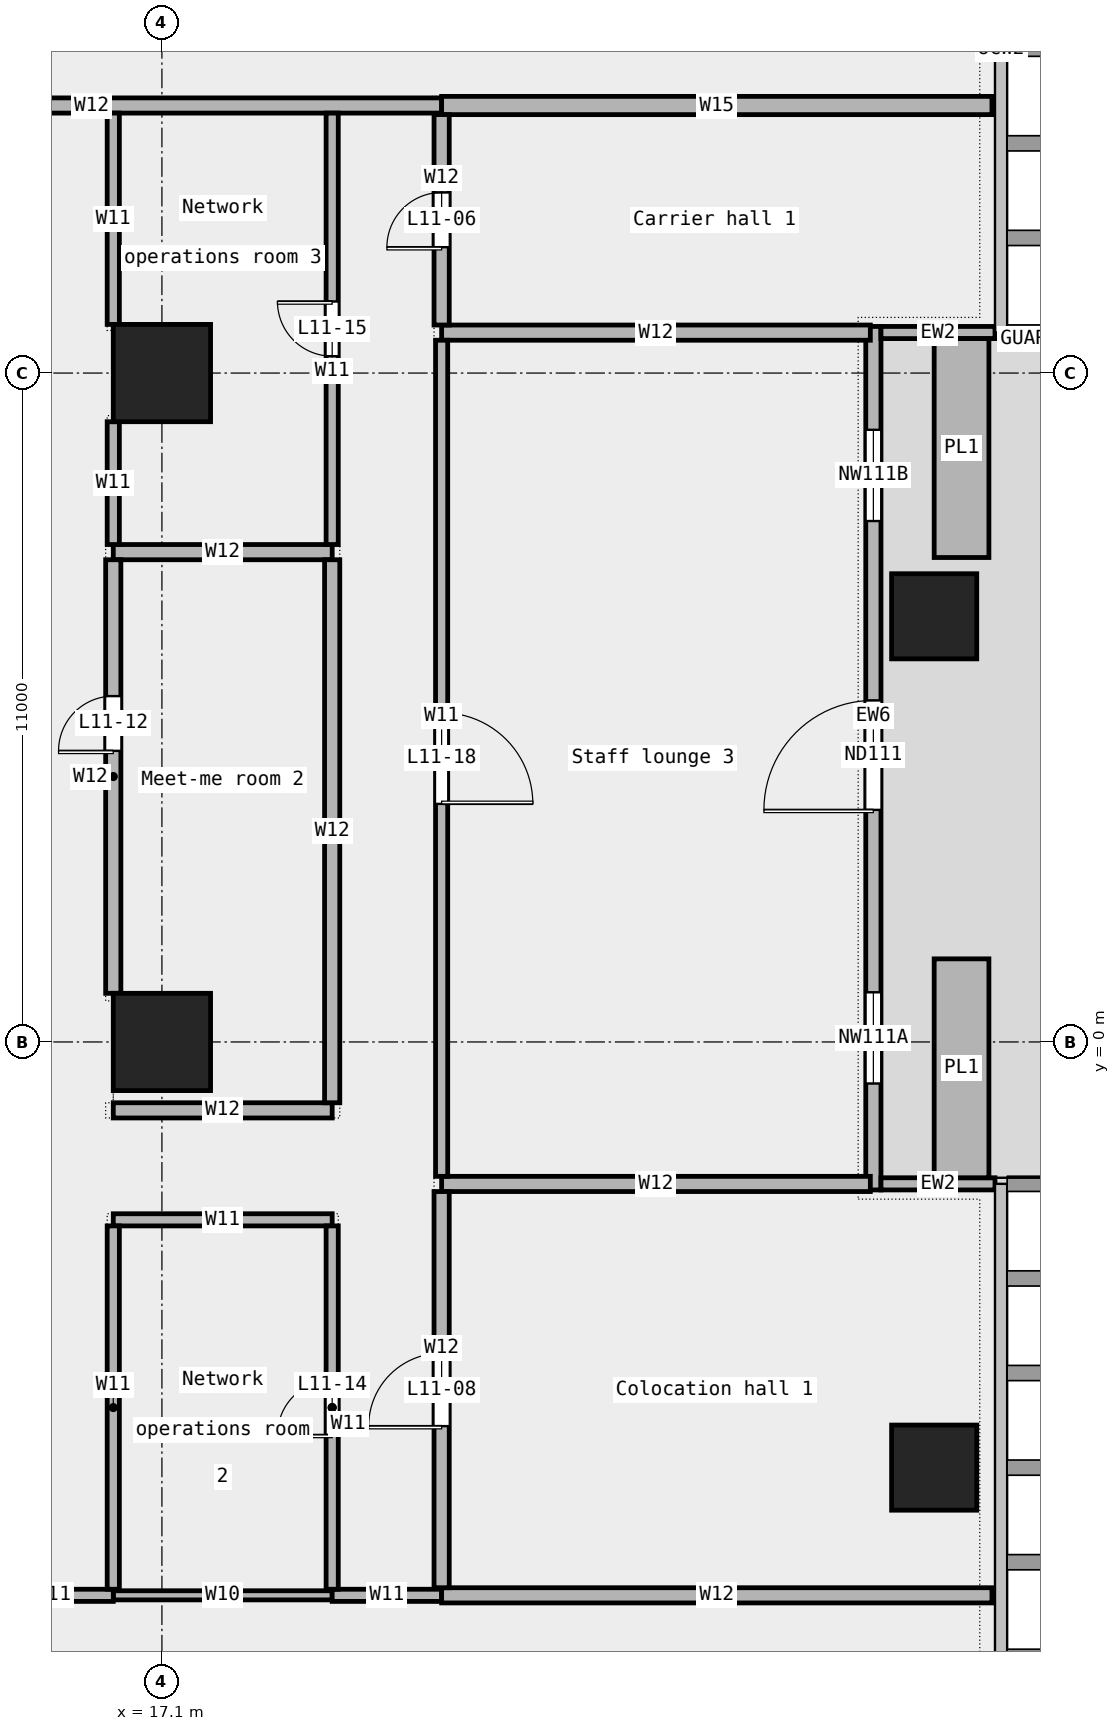
"""IFC4 building model, lengths in metres.
Left out: names, types, materials, properties, quantities, classifications, styles, units other than length and angle.
Written with IfcOpenShell. Run it as: python <this file> out.ifc"""

import sys

from ifc_helpers import new_model, si_unit, direction, frame, frame_2d, origin, origin_2d, place, context, subcontext, project, spatial, rectangle, extrude, element, fill, save


model = new_model("IFC4")
c1 = context("Model", 3, precision=1e-05, world=origin(), true_north=direction((0.0, 1.0)))
c2 = subcontext(c1, "Body", "Model", "MODEL_VIEW")
j1 = project(units=[si_unit("LENGTHUNIT", "METRE"), si_unit("PLANEANGLEUNIT", "RADIAN")], contexts=[c1])
p1 = place(None, origin())
s1 = spatial("IfcSite", under=j1, at=p1, CompositionType="ELEMENT")
p2 = place(p1, origin())
s2 = spatial("IfcBuilding", under=s1, at=p2, CompositionType="ELEMENT")
p3 = place(p2, frame((0.0, 0.0, 59.8)))
s3 = spatial("IfcBuildingStorey", under=s2, at=p3, CompositionType="ELEMENT", Elevation=59.8)
for number, where, z_axis, x_axis in (
    (1, (29.8, -7.0, 0.0), (0.0, 0.0, 1.0), (1.0, 0.0, 0.0)),
    (2, (29.8, 7.0, 0.0), (0.0, 0.0, 1.0), (1.0, 0.0, 0.0)),
):
    element("IfcColumn", number, at=place(p3, frame(where, z_axis=z_axis, x_axis=x_axis)), inside=s3, PredefinedType="COLUMN", context=c2, shape_type="SweptSolid", body=[
        extrude(rectangle(XDim=1.4, YDim=1.4, at=origin_2d()), origin(), (0.0, 0.0, 1.0), 4.35),
    ])
for number, where, z_axis, x_axis in (
    (3, (17.1, 0.0, 0.0), (0.0, 0.0, 1.0), (1.0, 0.0, 0.0)),
    (4, (17.1, 11.0, 0.0), (0.0, 0.0, 1.0), (1.0, 0.0, 0.0)),
):
    element("IfcColumn", number, at=place(p3, frame(where, z_axis=z_axis, x_axis=x_axis)), inside=s3, PredefinedType="COLUMN", context=c2, shape_type="SweptSolid", body=[
        extrude(rectangle(XDim=1.6, YDim=1.6, at=origin_2d()), origin(), (0.0, 0.0, 1.0), 4.35),
    ])
p4 = place(p3, frame((28.8, -2.433, 0.0), z_axis=(0.0, 0.0, 1.0), x_axis=(0.0, 1.0, 0.0)))
e5 = element("IfcWall", 5, at=p4, inside=s3, PredefinedType="STANDARD", context=c2, shape_type="SweptSolid", body=[
    extrude(rectangle(XDim=14.2, YDim=0.25, at=frame_2d((7.1, 0.0))), origin(), (0.0, 0.0, 1.0), 4.35),
])
p5 = place(p4, frame((1.75, 0.0, 0.45)))
e6 = element("IfcOpeningElement", 6, at=p5, cuts=e5, PredefinedType="OPENING", context=c2, shape_type="SweptSolid", body=[
    extrude(rectangle(XDim=1.5, YDim=3.0, at=frame_2d((0.75, 1.5))), frame((0.0, 0.137, 0.0), z_axis=(0.0, -1.0, 0.0), x_axis=(1.0, 0.0, 0.0)), (0.0, 0.0, 1.0), 0.274),
])
p6 = place(p4, frame((6.25, 0.0, 0.0)))
e7 = element("IfcOpeningElement", 7, at=p6, cuts=e5, PredefinedType="OPENING", context=c2, shape_type="SweptSolid", body=[
    extrude(rectangle(XDim=1.8, YDim=2.4, at=frame_2d((0.9, 1.2))), frame((0.0, 0.137, 0.0), z_axis=(0.0, -1.0, 0.0), x_axis=(1.0, 0.0, 0.0)), (0.0, 0.0, 1.0), 0.274),
])
p7 = place(p4, frame((11.0, 0.0, 0.45)))
e8 = element("IfcOpeningElement", 8, at=p7, cuts=e5, PredefinedType="OPENING", context=c2, shape_type="SweptSolid", body=[
    extrude(rectangle(XDim=1.5, YDim=3.0, at=frame_2d((0.75, 1.5))), frame((0.0, 0.137, 0.0), z_axis=(0.0, -1.0, 0.0), x_axis=(1.0, 0.0, 0.0)), (0.0, 0.0, 1.0), 0.274),
])
for number, where, z_axis, x_axis in (
    (9, (30.8, -2.333, 0.0), (0.0, 0.0, 1.0), (-1.0, 0.0, 0.0)),
    (10, (30.8, 11.667, 0.0), (0.0, 0.0, 1.0), (-1.0, 0.0, 0.0)),
):
    element("IfcWall", number, at=place(p3, frame(where, z_axis=z_axis, x_axis=x_axis)), inside=s3, PredefinedType="STANDARD", context=c2, shape_type="SweptSolid", body=[
        extrude(rectangle(XDim=1.875, YDim=0.2, at=frame_2d((0.938, 0.0))), origin(), (0.0, 0.0, 1.0), 4.35),
    ])
for number, where, z_axis, x_axis in (
    (11, (30.25, -2.233, 0.0), (0.0, 0.0, 1.0), (0.0, 1.0, 0.0)),
    (12, (30.25, 7.967, 0.0), (0.0, 0.0, 1.0), (0.0, 1.0, 0.0)),
):
    element("IfcWall", number, at=place(p3, frame(where, z_axis=z_axis, x_axis=x_axis)), inside=s3, PredefinedType="STANDARD", context=c2, shape_type="SweptSolid", body=[
        extrude(rectangle(XDim=3.6, YDim=0.9, at=frame_2d((1.8, 0.0))), origin(), (0.0, 0.0, 1.0), 0.7),
    ])
p8 = place(p3, frame((16.3, -9.1, 0.0), z_axis=(0.0, 0.0, 1.0), x_axis=(1.0, 0.0, 0.0)))
e13 = element("IfcWall", 13, at=p8, inside=s3, PredefinedType="PARTITIONING", context=c2, shape_type="SweptSolid", body=[
    extrude(rectangle(XDim=3.6, YDim=0.15, at=frame_2d((1.8, 0.0))), origin(), (0.0, 0.0, 1.0), 4.35),
])
p9 = place(p3, frame((14.34, -9.1, 0.0), z_axis=(0.0, 0.0, 1.0), x_axis=(1.0, 0.0, 0.0)))
e14 = element("IfcWall", 14, at=p9, inside=s3, PredefinedType="PARTITIONING", context=c2, shape_type="SweptSolid", body=[
    extrude(rectangle(XDim=1.96, YDim=0.2, at=frame_2d((0.98, 0.0))), origin(), (0.0, 0.0, 1.0), 4.35),
])
p10 = place(p3, frame((19.9, -9.1, 0.0), z_axis=(0.0, 0.0, 1.0), x_axis=(1.0, 0.0, 0.0)))
e15 = element("IfcWall", 15, at=p10, inside=s3, PredefinedType="PARTITIONING", context=c2, shape_type="SweptSolid", body=[
    extrude(rectangle(XDim=1.8, YDim=0.2, at=frame_2d((0.9, 0.0))), origin(), (0.0, 0.0, 1.0), 4.35),
])
p11 = place(p3, frame((21.7, -9.1, 0.0), z_axis=(0.0, 0.0, 1.0), x_axis=(1.0, 0.0, 0.0)))
e16 = element("IfcWall", 16, at=p11, inside=s3, PredefinedType="PARTITIONING", context=c2, shape_type="SweptSolid", body=[
    extrude(rectangle(XDim=9.05, YDim=0.25, at=frame_2d((4.525, 0.0))), origin(), (0.0, 0.0, 1.0), 4.35),
])
p12 = place(p3, frame((16.3, -2.925, 0.0), z_axis=(0.0, 0.0, 1.0), x_axis=(1.0, 0.0, 0.0)))
e17 = element("IfcWall", 17, at=p12, inside=s3, PredefinedType="PARTITIONING", context=c2, shape_type="SweptSolid", body=[
    extrude(rectangle(XDim=3.6, YDim=0.2, at=frame_2d((1.8, 0.0))), origin(), (0.0, 0.0, 1.0), 4.35),
])
p13 = place(p3, frame((21.7, -2.335, 0.0), z_axis=(0.0, 0.0, 1.0), x_axis=(1.0, 0.0, 0.0)))
e18 = element("IfcWall", 18, at=p13, inside=s3, PredefinedType="PARTITIONING", context=c2, shape_type="SweptSolid", body=[
    extrude(rectangle(XDim=7.05, YDim=0.25, at=frame_2d((3.525, 0.0))), origin(), (0.0, 0.0, 1.0), 4.35),
])
for number, where, z_axis, x_axis in (
    (19, (16.3, -1.125, 0.0), (0.0, 0.0, 1.0), (1.0, 0.0, 0.0)),
    (20, (16.3, 8.055, 0.0), (0.0, 0.0, 1.0), (1.0, 0.0, 0.0)),
):
    element("IfcWall", number, at=place(p3, frame(where, z_axis=z_axis, x_axis=x_axis)), inside=s3, PredefinedType="PARTITIONING", context=c2, shape_type="SweptSolid", body=[
        extrude(rectangle(XDim=3.6, YDim=0.25, at=frame_2d((1.8, 0.0))), origin(), (0.0, 0.0, 1.0), 4.35),
    ])
p14 = place(p3, frame((21.7, 11.665, 0.0), z_axis=(0.0, 0.0, 1.0), x_axis=(1.0, 0.0, 0.0)))
e21 = element("IfcWall", 21, at=p14, inside=s3, PredefinedType="PARTITIONING", context=c2, shape_type="SweptSolid", body=[
    extrude(rectangle(XDim=7.05, YDim=0.25, at=frame_2d((3.525, 0.0))), origin(), (0.0, 0.0, 1.0), 4.35),
])
p15 = place(p3, frame((10.185, 15.4, 0.0), z_axis=(0.0, 0.0, 1.0), x_axis=(1.0, 0.0, 0.0)))
e22 = element("IfcWall", 22, at=p15, inside=s3, PredefinedType="PARTITIONING", context=c2, shape_type="SweptSolid", body=[
    extrude(rectangle(XDim=11.515, YDim=0.25, at=frame_2d((5.757, 0.0))), origin(), (0.0, 0.0, 1.0), 4.35),
])
p16 = place(p15, frame((2.157, 0.0, 0.0)))
e23 = element("IfcOpeningElement", 23, at=p16, cuts=e22, PredefinedType="OPENING", context=c2, shape_type="SweptSolid", body=[
    extrude(rectangle(XDim=1.8, YDim=2.1, at=frame_2d((0.9, 1.05))), frame((0.0, 0.137, 0.0), z_axis=(0.0, -1.0, 0.0), x_axis=(1.0, 0.0, 0.0)), (0.0, 0.0, 1.0), 0.274),
])
p17 = place(p3, frame((21.7, 15.4, 0.0), z_axis=(0.0, 0.0, 1.0), x_axis=(1.0, 0.0, 0.0)))
e24 = element("IfcWall", 24, at=p17, inside=s3, PredefinedType="PARTITIONING", context=c2, shape_type="SweptSolid", body=[
    extrude(rectangle(XDim=9.05, YDim=0.3, at=frame_2d((4.525, 0.0))), origin(), (0.0, 0.0, 1.0), 4.35),
])
p18 = place(p3, frame((16.3, -9.0, 0.0), z_axis=(0.0, 0.0, 1.0), x_axis=(0.0, 1.0, 0.0)))
e25 = element("IfcWall", 25, at=p18, inside=s3, PredefinedType="PARTITIONING", context=c2, shape_type="SweptSolid", body=[
    extrude(rectangle(XDim=5.975, YDim=0.2, at=frame_2d((2.988, 0.0))), origin(), (0.0, 0.0, 1.0), 4.35),
])
p19 = place(p3, frame((16.3, 8.18, 0.0), z_axis=(0.0, 0.0, 1.0), x_axis=(0.0, 1.0, 0.0)))
e26 = element("IfcWall", 26, at=p19, inside=s3, PredefinedType="PARTITIONING", context=c2, shape_type="SweptSolid", body=[
    extrude(rectangle(XDim=2.02, YDim=0.2, at=frame_2d((1.01, 0.0))), origin(), (0.0, 0.0, 1.0), 4.35),
])
p20 = place(p3, frame((16.3, 11.8, 0.0), z_axis=(0.0, 0.0, 1.0), x_axis=(0.0, 1.0, 0.0)))
e27 = element("IfcWall", 27, at=p20, inside=s3, PredefinedType="PARTITIONING", context=c2, shape_type="SweptSolid", body=[
    extrude(rectangle(XDim=3.475, YDim=0.2, at=frame_2d((1.737, 0.0))), origin(), (0.0, 0.0, 1.0), 4.35),
])
p21 = place(p3, frame((16.3, 0.8, 0.0), z_axis=(0.0, 0.0, 1.0), x_axis=(0.0, 1.0, 0.0)))
e28 = element("IfcWall", 28, at=p21, inside=s3, PredefinedType="PARTITIONING", context=c2, shape_type="SweptSolid", body=[
    extrude(rectangle(XDim=7.13, YDim=0.25, at=frame_2d((3.565, 0.0))), origin(), (0.0, 0.0, 1.0), 4.35),
])
p22 = place(p21, frame((3.988, 0.0, 0.0)))
e29 = element("IfcOpeningElement", 29, at=p22, cuts=e28, PredefinedType="OPENING", context=c2, shape_type="SweptSolid", body=[
    extrude(rectangle(XDim=0.9, YDim=2.1, at=frame_2d((0.45, 1.05))), frame((0.0, 0.137, 0.0), z_axis=(0.0, -1.0, 0.0), x_axis=(1.0, 0.0, 0.0)), (0.0, 0.0, 1.0), 0.274),
])
p23 = place(p3, frame((19.9, -9.0, 0.0), z_axis=(0.0, 0.0, 1.0), x_axis=(0.0, 1.0, 0.0)))
e30 = element("IfcWall", 30, at=p23, inside=s3, PredefinedType="PARTITIONING", context=c2, shape_type="SweptSolid", body=[
    extrude(rectangle(XDim=5.975, YDim=0.2, at=frame_2d((2.988, 0.0))), origin(), (0.0, 0.0, 1.0), 4.35),
])
p24 = place(p23, frame((2.538, 0.0, 0.0)))
e31 = element("IfcOpeningElement", 31, at=p24, cuts=e30, PredefinedType="OPENING", context=c2, shape_type="SweptSolid", body=[
    extrude(rectangle(XDim=0.9, YDim=2.1, at=frame_2d((0.45, 1.05))), frame((0.0, 0.112, 0.0), z_axis=(0.0, -1.0, 0.0), x_axis=(1.0, 0.0, 0.0)), (0.0, 0.0, 1.0), 0.224),
])
p25 = place(p3, frame((19.9, 8.18, 0.0), z_axis=(0.0, 0.0, 1.0), x_axis=(0.0, 1.0, 0.0)))
e32 = element("IfcWall", 32, at=p25, inside=s3, PredefinedType="PARTITIONING", context=c2, shape_type="SweptSolid", body=[
    extrude(rectangle(XDim=7.095, YDim=0.2, at=frame_2d((3.547, 0.0))), origin(), (0.0, 0.0, 1.0), 4.35),
])
p26 = place(p25, frame((3.097, 0.0, 0.0)))
e33 = element("IfcOpeningElement", 33, at=p26, cuts=e32, PredefinedType="OPENING", context=c2, shape_type="SweptSolid", body=[
    extrude(rectangle(XDim=0.9, YDim=2.1, at=frame_2d((0.45, 1.05))), frame((0.0, 0.112, 0.0), z_axis=(0.0, -1.0, 0.0), x_axis=(1.0, 0.0, 0.0)), (0.0, 0.0, 1.0), 0.224),
])
p27 = place(p3, frame((19.9, -1.0, 0.0), z_axis=(0.0, 0.0, 1.0), x_axis=(0.0, 1.0, 0.0)))
e34 = element("IfcWall", 34, at=p27, inside=s3, PredefinedType="PARTITIONING", context=c2, shape_type="SweptSolid", body=[
    extrude(rectangle(XDim=8.93, YDim=0.25, at=frame_2d((4.465, 0.0))), origin(), (0.0, 0.0, 1.0), 4.35),
])
p28 = place(p3, frame((21.7, -2.21, 0.0), z_axis=(0.0, 0.0, 1.0), x_axis=(0.0, 1.0, 0.0)))
e35 = element("IfcWall", 35, at=p28, inside=s3, PredefinedType="PARTITIONING", context=c2, shape_type="SweptSolid", body=[
    extrude(rectangle(XDim=13.75, YDim=0.2, at=frame_2d((6.875, 0.0))), origin(), (0.0, 0.0, 1.0), 4.35),
])
p29 = place(p28, frame((6.125, 0.0, 0.0)))
e36 = element("IfcOpeningElement", 36, at=p29, cuts=e35, PredefinedType="OPENING", context=c2, shape_type="SweptSolid", body=[
    extrude(rectangle(XDim=1.5, YDim=2.1, at=frame_2d((0.75, 1.05))), frame((0.0, 0.112, 0.0), z_axis=(0.0, -1.0, 0.0), x_axis=(1.0, 0.0, 0.0)), (0.0, 0.0, 1.0), 0.224),
])
p30 = place(p3, frame((21.7, -8.975, 0.0), z_axis=(0.0, 0.0, 1.0), x_axis=(0.0, 1.0, 0.0)))
e37 = element("IfcWall", 37, at=p30, inside=s3, PredefinedType="PARTITIONING", context=c2, shape_type="SweptSolid", body=[
    extrude(rectangle(XDim=6.515, YDim=0.25, at=frame_2d((3.258, 0.0))), origin(), (0.0, 0.0, 1.0), 4.35),
])
p31 = place(p30, frame((2.657, 0.0, 0.0)))
e38 = element("IfcOpeningElement", 38, at=p31, cuts=e37, PredefinedType="OPENING", context=c2, shape_type="SweptSolid", body=[
    extrude(rectangle(XDim=1.2, YDim=2.1, at=frame_2d((0.6, 1.05))), frame((0.0, 0.137, 0.0), z_axis=(0.0, -1.0, 0.0), x_axis=(1.0, 0.0, 0.0)), (0.0, 0.0, 1.0), 0.274),
])
p32 = place(p3, frame((21.7, 11.79, 0.0), z_axis=(0.0, 0.0, 1.0), x_axis=(0.0, 1.0, 0.0)))
e39 = element("IfcWall", 39, at=p32, inside=s3, PredefinedType="PARTITIONING", context=c2, shape_type="SweptSolid", body=[
    extrude(rectangle(XDim=3.46, YDim=0.25, at=frame_2d((1.73, 0.0))), origin(), (0.0, 0.0, 1.0), 4.35),
])
p33 = place(p32, frame((1.28, 0.0, 0.0)))
e40 = element("IfcOpeningElement", 40, at=p33, cuts=e39, PredefinedType="OPENING", context=c2, shape_type="SweptSolid", body=[
    extrude(rectangle(XDim=0.9, YDim=2.1, at=frame_2d((0.45, 1.05))), frame((0.0, 0.137, 0.0), z_axis=(0.0, -1.0, 0.0), x_axis=(1.0, 0.0, 0.0)), (0.0, 0.0, 1.0), 0.274),
])
p34 = place(p5, origin())
e41 = element("IfcWindow", 41, at=p34, inside=s3, PartitioningType="SINGLE_PANEL", PredefinedType="WINDOW", context=c2, shape_type="SweptSolid", body=[
    extrude(rectangle(XDim=1.5, YDim=3.0, at=frame_2d((0.75, 1.5))), frame((0.0, 0.03, 0.0), z_axis=(0.0, -1.0, 0.0), x_axis=(1.0, 0.0, 0.0)), (0.0, 0.0, 1.0), 0.06),
])
fill(e6, e41)
p35 = place(p6, origin())
e42 = element("IfcDoor", 42, at=p35, inside=s3, OperationType="DOUBLE_DOOR_SINGLE_SWING", PredefinedType="DOOR", context=c2, shape_type="SweptSolid", body=[
    extrude(rectangle(XDim=1.8, YDim=2.4, at=frame_2d((0.9, 1.2))), frame((0.0, 0.025, 0.0), z_axis=(0.0, -1.0, 0.0), x_axis=(1.0, 0.0, 0.0)), (0.0, 0.0, 1.0), 0.05),
])
fill(e7, e42)
p36 = place(p7, origin())
e43 = element("IfcWindow", 43, at=p36, inside=s3, PartitioningType="SINGLE_PANEL", PredefinedType="WINDOW", context=c2, shape_type="SweptSolid", body=[
    extrude(rectangle(XDim=1.5, YDim=3.0, at=frame_2d((0.75, 1.5))), frame((0.0, 0.03, 0.0), z_axis=(0.0, -1.0, 0.0), x_axis=(1.0, 0.0, 0.0)), (0.0, 0.0, 1.0), 0.06),
])
fill(e8, e43)
p37 = place(p33, origin())
e44 = element("IfcDoor", 44, at=p37, inside=s3, OperationType="SINGLE_SWING_LEFT", PredefinedType="DOOR", context=c2, shape_type="SweptSolid", body=[
    extrude(rectangle(XDim=0.9, YDim=2.1, at=frame_2d((0.45, 1.05))), frame((0.0, 0.025, 0.0), z_axis=(0.0, -1.0, 0.0), x_axis=(1.0, 0.0, 0.0)), (0.0, 0.0, 1.0), 0.05),
])
fill(e40, e44)
p38 = place(p31, origin())
e45 = element("IfcDoor", 45, at=p38, inside=s3, OperationType="SINGLE_SWING_LEFT", PredefinedType="DOOR", context=c2, shape_type="SweptSolid", body=[
    extrude(rectangle(XDim=1.2, YDim=2.1, at=frame_2d((0.6, 1.05))), frame((0.0, 0.025, 0.0), z_axis=(0.0, -1.0, 0.0), x_axis=(1.0, 0.0, 0.0)), (0.0, 0.0, 1.0), 0.05),
])
fill(e38, e45)
p39 = place(p22, origin())
e46 = element("IfcDoor", 46, at=p39, inside=s3, OperationType="SINGLE_SWING_LEFT", PredefinedType="DOOR", context=c2, shape_type="SweptSolid", body=[
    extrude(rectangle(XDim=0.9, YDim=2.1, at=frame_2d((0.45, 1.05))), frame((0.0, 0.025, 0.0), z_axis=(0.0, -1.0, 0.0), x_axis=(1.0, 0.0, 0.0)), (0.0, 0.0, 1.0), 0.05),
])
fill(e29, e46)
p40 = place(p24, origin())
e47 = element("IfcDoor", 47, at=p40, inside=s3, OperationType="SINGLE_SWING_LEFT", PredefinedType="DOOR", context=c2, shape_type="SweptSolid", body=[
    extrude(rectangle(XDim=0.9, YDim=2.1, at=frame_2d((0.45, 1.05))), frame((0.0, 0.025, 0.0), z_axis=(0.0, -1.0, 0.0), x_axis=(1.0, 0.0, 0.0)), (0.0, 0.0, 1.0), 0.05),
])
fill(e31, e47)
p41 = place(p26, origin())
e48 = element("IfcDoor", 48, at=p41, inside=s3, OperationType="SINGLE_SWING_RIGHT", PredefinedType="DOOR", context=c2, shape_type="SweptSolid", body=[
    extrude(rectangle(XDim=0.9, YDim=2.1, at=frame_2d((0.45, 1.05))), frame((0.0, 0.025, 0.0), z_axis=(0.0, -1.0, 0.0), x_axis=(1.0, 0.0, 0.0)), (0.0, 0.0, 1.0), 0.05),
])
fill(e33, e48)
p42 = place(p29, origin())
e49 = element("IfcDoor", 49, at=p42, inside=s3, OperationType="DOUBLE_DOOR_SINGLE_SWING", PredefinedType="DOOR", context=c2, shape_type="SweptSolid", body=[
    extrude(rectangle(XDim=1.5, YDim=2.1, at=frame_2d((0.75, 1.05))), frame((0.0, 0.025, 0.0), z_axis=(0.0, -1.0, 0.0), x_axis=(1.0, 0.0, 0.0)), (0.0, 0.0, 1.0), 0.05),
])
fill(e36, e49)
save(model, sys.argv[1])
